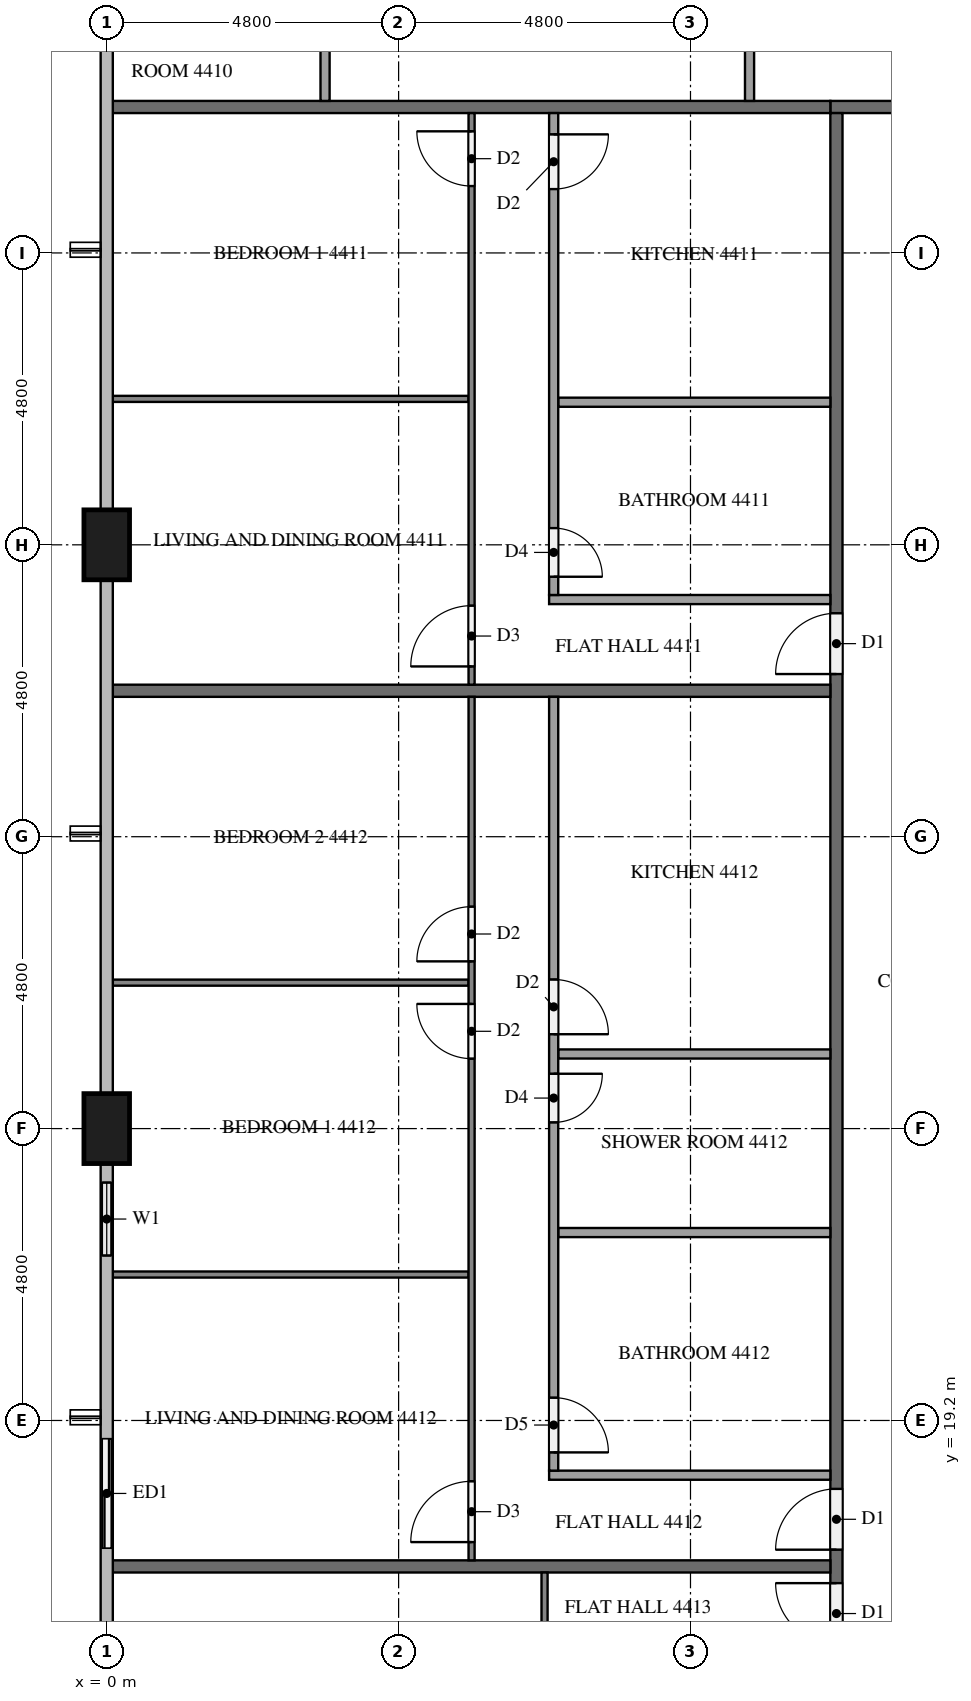
"""IFC4 building model, lengths in metres.
Left out: names, types, materials, properties, quantities, classifications, styles, units other than length and angle.
Written with IfcOpenShell. Run it as: python <this file> out.ifc"""

import sys

from ifc_helpers import new_model, si_unit, direction, frame, frame_2d, origin, origin_2d, place, context, subcontext, project, spatial, rectangle, extrude, element, fill, save


model = new_model("IFC4")
c1 = context("Model", 3, precision=1e-05, world=origin(), true_north=direction((0.0, 1.0)))
c2 = subcontext(c1, "Body", "Model", "MODEL_VIEW")
j1 = project(units=[si_unit("LENGTHUNIT", "METRE"), si_unit("PLANEANGLEUNIT", "RADIAN")], contexts=[c1])
p1 = place(None, origin())
s1 = spatial("IfcSite", under=j1, at=p1, CompositionType="ELEMENT")
p2 = place(p1, origin())
s2 = spatial("IfcBuilding", under=s1, at=p2, CompositionType="ELEMENT")
p3 = place(p2, frame((0.0, 0.0, 170.0)))
s3 = spatial("IfcBuildingStorey", under=s2, at=p3, CompositionType="ELEMENT", Elevation=170.0)
for number, where, z_axis, x_axis in (
    (1, (0.0, 33.6, 0.0), (0.0, 0.0, 1.0), (0.0, 1.0, 0.0)),
    (2, (0.0, 24.0, 0.0), (0.0, 0.0, 1.0), (0.0, 1.0, 0.0)),
):
    element("IfcColumn", number, at=place(p3, frame(where, z_axis=z_axis, x_axis=x_axis)), inside=s3, PredefinedType="COLUMN", context=c2, shape_type="SweptSolid", body=[
        extrude(rectangle(XDim=1.15, YDim=0.75, at=origin_2d()), origin(), (0.0, 0.0, 1.0), 3.1),
    ])
p4 = place(p3, frame((0.0, 23.425, 0.0), z_axis=(0.0, 0.0, 1.0), x_axis=(0.0, -1.0, 0.0)))
e3 = element("IfcWall", 3, at=p4, inside=s3, PredefinedType="SOLIDWALL", context=c2, shape_type="SweptSolid", body=[
    extrude(rectangle(XDim=1.825, YDim=0.15, at=frame_2d((0.913, 0.0))), origin(), (0.0, 0.0, 1.0), 3.1),
])
p5 = place(p4, frame((0.312, 0.0, 0.9)))
e4 = element("IfcOpeningElement", 4, at=p5, cuts=e3, PredefinedType="OPENING", context=c2, shape_type="SweptSolid", body=[
    extrude(rectangle(XDim=1.2, YDim=1.4, at=frame_2d((0.6, 0.7))), frame((0.0, 0.085, 0.0), z_axis=(0.0, -1.0, 0.0), x_axis=(1.0, 0.0, 0.0)), (0.0, 0.0, 1.0), 0.17),
])
p6 = place(p3, frame((0.0, 19.2, 0.0), z_axis=(0.0, 0.0, 1.0), x_axis=(0.0, -1.0, 0.0)))
e5 = element("IfcWall", 5, at=p6, inside=s3, PredefinedType="SOLIDWALL", context=c2, shape_type="SweptSolid", body=[
    extrude(rectangle(XDim=2.4, YDim=0.15, at=frame_2d((1.2, 0.0))), origin(), (0.0, 0.0, 1.0), 3.1),
])
p7 = place(p6, frame((0.3, 0.0, 0.0)))
e6 = element("IfcOpeningElement", 6, at=p7, cuts=e5, PredefinedType="OPENING", context=c2, shape_type="SweptSolid", body=[
    extrude(rectangle(XDim=1.8, YDim=2.4, at=frame_2d((0.9, 1.2))), frame((0.0, 0.085, 0.0), z_axis=(0.0, -1.0, 0.0), x_axis=(1.0, 0.0, 0.0)), (0.0, 0.0, 1.0), 0.17),
])
p8 = place(p3, frame((11.9, 40.8, 0.0), z_axis=(0.0, 0.0, 1.0), x_axis=(1.0, 0.0, 0.0)))
e7 = element("IfcWall", 7, at=p8, inside=s3, PredefinedType="PARTITIONING", context=c2, shape_type="SweptSolid", body=[
    extrude(rectangle(XDim=38.6, YDim=0.2, at=frame_2d((19.3, 0.0))), origin(), (0.0, 0.0, 1.0), 3.1),
])
p9 = place(p8, frame((37.175, 0.0, 0.0)))
e8 = element("IfcOpeningElement", 8, at=p9, cuts=e7, PredefinedType="OPENING", context=c2, shape_type="SweptSolid", body=[
    extrude(rectangle(XDim=1.1, YDim=2.1, at=frame_2d((0.55, 1.05))), frame((0.0, 0.11, 0.0), z_axis=(0.0, -1.0, 0.0), x_axis=(1.0, 0.0, 0.0)), (0.0, 0.0, 1.0), 0.22),
])
p10 = place(p8, frame((18.025, 0.0, 0.0)))
e9 = element("IfcOpeningElement", 9, at=p10, cuts=e7, PredefinedType="OPENING", context=c2, shape_type="SweptSolid", body=[
    extrude(rectangle(XDim=1.0, YDim=2.1, at=frame_2d((0.5, 1.05))), frame((0.0, 0.11, 0.0), z_axis=(0.0, -1.0, 0.0), x_axis=(1.0, 0.0, 0.0)), (0.0, 0.0, 1.0), 0.22),
])
p11 = place(p8, frame((3.625, 0.0, 0.0)))
e10 = element("IfcOpeningElement", 10, at=p11, cuts=e7, PredefinedType="OPENING", context=c2, shape_type="SweptSolid", body=[
    extrude(rectangle(XDim=1.0, YDim=2.1, at=frame_2d((0.5, 1.05))), frame((0.0, 0.11, 0.0), z_axis=(0.0, -1.0, 0.0), x_axis=(1.0, 0.0, 0.0)), (0.0, 0.0, 1.0), 0.22),
])
p12 = place(p3, frame((12.0, 12.1, 0.0), z_axis=(0.0, 0.0, 1.0), x_axis=(0.0, 1.0, 0.0)))
e11 = element("IfcWall", 11, at=p12, inside=s3, PredefinedType="PARTITIONING", context=c2, shape_type="SweptSolid", body=[
    extrude(rectangle(XDim=28.6, YDim=0.2, at=frame_2d((14.3, 0.0))), origin(), (0.0, 0.0, 1.0), 3.1),
])
p13 = place(p12, frame((19.375, 0.0, 0.0)))
e12 = element("IfcOpeningElement", 12, at=p13, cuts=e11, PredefinedType="OPENING", context=c2, shape_type="SweptSolid", body=[
    extrude(rectangle(XDim=1.0, YDim=2.1, at=frame_2d((0.5, 1.05))), frame((0.0, 0.11, 0.0), z_axis=(0.0, -1.0, 0.0), x_axis=(1.0, 0.0, 0.0)), (0.0, 0.0, 1.0), 0.22),
])
p14 = place(p12, frame((4.975, 0.0, 0.0)))
e13 = element("IfcOpeningElement", 13, at=p14, cuts=e11, PredefinedType="OPENING", context=c2, shape_type="SweptSolid", body=[
    extrude(rectangle(XDim=1.0, YDim=2.1, at=frame_2d((0.5, 1.05))), frame((0.0, 0.11, 0.0), z_axis=(0.0, -1.0, 0.0), x_axis=(1.0, 0.0, 0.0)), (0.0, 0.0, 1.0), 0.22),
])
p15 = place(p12, frame((3.425, 0.0, 0.0)))
e14 = element("IfcOpeningElement", 14, at=p15, cuts=e11, PredefinedType="OPENING", context=c2, shape_type="SweptSolid", body=[
    extrude(rectangle(XDim=1.0, YDim=2.1, at=frame_2d((0.5, 1.05))), frame((0.0, 0.11, 0.0), z_axis=(0.0, -1.0, 0.0), x_axis=(1.0, 0.0, 0.0)), (0.0, 0.0, 1.0), 0.22),
])
for number, where, z_axis, x_axis in (
    (15, (0.1, 40.8, 0.0), (0.0, 0.0, 1.0), (1.0, 0.0, 0.0)),
    (16, (0.1, 31.2, 0.0), (0.0, 0.0, 1.0), (1.0, 0.0, 0.0)),
    (17, (0.1, 16.8, 0.0), (0.0, 0.0, 1.0), (1.0, 0.0, 0.0)),
):
    element("IfcWall", number, at=place(p3, frame(where, z_axis=z_axis, x_axis=x_axis)), inside=s3, PredefinedType="PARTITIONING", context=c2, shape_type="SweptSolid", body=[
        extrude(rectangle(XDim=11.8, YDim=0.2, at=frame_2d((5.9, 0.0))), origin(), (0.0, 0.0, 1.0), 3.1),
    ])
for number, where, z_axis, x_axis in (
    (18, (10.571, 40.9, 0.0), (0.0, 0.0, 1.0), (0.0, 1.0, 0.0)),
    (19, (3.59, 40.9, 0.0), (0.0, 0.0, 1.0), (0.0, 1.0, 0.0)),
):
    element("IfcWall", number, at=place(p3, frame(where, z_axis=z_axis, x_axis=x_axis)), inside=s3, PredefinedType="PARTITIONING", context=c2, shape_type="SweptSolid", body=[
        extrude(rectangle(XDim=2.375, YDim=0.15, at=frame_2d((1.188, 0.0))), origin(), (0.0, 0.0, 1.0), 3.1),
    ])
p16 = place(p3, frame((5.95, 36.0, 0.0), z_axis=(0.0, 0.0, 1.0), x_axis=(-1.0, 0.0, 0.0)))
e20 = element("IfcWall", 20, at=p16, inside=s3, PredefinedType="PARTITIONING", context=c2, shape_type="SweptSolid", body=[
    extrude(rectangle(XDim=5.85, YDim=0.1, at=frame_2d((2.925, 0.0))), origin(), (0.0, 0.0, 1.0), 3.1),
])
p17 = place(p3, frame((6.0, 31.3, 0.0), z_axis=(0.0, 0.0, 1.0), x_axis=(0.0, 1.0, 0.0)))
e21 = element("IfcWall", 21, at=p17, inside=s3, PredefinedType="PARTITIONING", context=c2, shape_type="SweptSolid", body=[
    extrude(rectangle(XDim=9.4, YDim=0.1, at=frame_2d((4.7, 0.0))), origin(), (0.0, 0.0, 1.0), 3.1),
])
p18 = place(p17, frame((0.3, 0.0, 0.0)))
e22 = element("IfcOpeningElement", 22, at=p18, cuts=e21, PredefinedType="OPENING", context=c2, shape_type="SweptSolid", body=[
    extrude(rectangle(XDim=1.0, YDim=2.1, at=frame_2d((0.5, 1.05))), frame((0.0, 0.06, 0.0), z_axis=(0.0, -1.0, 0.0), x_axis=(1.0, 0.0, 0.0)), (0.0, 0.0, 1.0), 0.12),
])
p19 = place(p17, frame((8.2, 0.0, 0.0)))
e23 = element("IfcOpeningElement", 23, at=p19, cuts=e21, PredefinedType="OPENING", context=c2, shape_type="SweptSolid", body=[
    extrude(rectangle(XDim=0.9, YDim=2.1, at=frame_2d((0.45, 1.05))), frame((0.0, 0.06, 0.0), z_axis=(0.0, -1.0, 0.0), x_axis=(1.0, 0.0, 0.0)), (0.0, 0.0, 1.0), 0.12),
])
p20 = place(p3, frame((11.9, 35.945, 0.0), z_axis=(0.0, 0.0, 1.0), x_axis=(-1.0, 0.0, 0.0)))
e24 = element("IfcWall", 24, at=p20, inside=s3, PredefinedType="PARTITIONING", context=c2, shape_type="SweptSolid", body=[
    extrude(rectangle(XDim=4.475, YDim=0.15, at=frame_2d((2.237, 0.0))), origin(), (0.0, 0.0, 1.0), 3.1),
])
p21 = place(p3, frame((11.9, 32.7, 0.0), z_axis=(0.0, 0.0, 1.0), x_axis=(-1.0, 0.0, 0.0)))
e25 = element("IfcWall", 25, at=p21, inside=s3, PredefinedType="PARTITIONING", context=c2, shape_type="SweptSolid", body=[
    extrude(rectangle(XDim=4.625, YDim=0.15, at=frame_2d((2.312, 0.0))), origin(), (0.0, 0.0, 1.0), 3.1),
])
p22 = place(p3, frame((7.35, 40.7, 0.0), z_axis=(0.0, 0.0, 1.0), x_axis=(0.0, -1.0, 0.0)))
e26 = element("IfcWall", 26, at=p22, inside=s3, PredefinedType="PARTITIONING", context=c2, shape_type="SweptSolid", body=[
    extrude(rectangle(XDim=7.925, YDim=0.15, at=frame_2d((3.962, 0.0))), origin(), (0.0, 0.0, 1.0), 3.1),
])
p23 = place(p22, frame((6.825, 0.0, 0.0)))
e27 = element("IfcOpeningElement", 27, at=p23, cuts=e26, PredefinedType="OPENING", context=c2, shape_type="SweptSolid", body=[
    extrude(rectangle(XDim=0.8, YDim=2.1, at=frame_2d((0.4, 1.05))), frame((0.0, 0.085, 0.0), z_axis=(0.0, -1.0, 0.0), x_axis=(1.0, 0.0, 0.0)), (0.0, 0.0, 1.0), 0.17),
])
p24 = place(p22, frame((0.35, 0.0, 0.0)))
e28 = element("IfcOpeningElement", 28, at=p24, cuts=e26, PredefinedType="OPENING", context=c2, shape_type="SweptSolid", body=[
    extrude(rectangle(XDim=0.9, YDim=2.1, at=frame_2d((0.45, 1.05))), frame((0.0, 0.085, 0.0), z_axis=(0.0, -1.0, 0.0), x_axis=(1.0, 0.0, 0.0)), (0.0, 0.0, 1.0), 0.17),
])
for number, where, z_axis, x_axis in (
    (29, (5.95, 21.6, 0.0), (0.0, 0.0, 1.0), (-1.0, 0.0, 0.0)),
    (30, (5.95, 26.4, 0.0), (0.0, 0.0, 1.0), (-1.0, 0.0, 0.0)),
):
    element("IfcWall", number, at=place(p3, frame(where, z_axis=z_axis, x_axis=x_axis)), inside=s3, PredefinedType="PARTITIONING", context=c2, shape_type="SweptSolid", body=[
        extrude(rectangle(XDim=5.85, YDim=0.1, at=frame_2d((2.925, 0.0))), origin(), (0.0, 0.0, 1.0), 3.1),
    ])
p25 = place(p3, frame((6.0, 16.9, 0.0), z_axis=(0.0, 0.0, 1.0), x_axis=(0.0, 1.0, 0.0)))
e31 = element("IfcWall", 31, at=p25, inside=s3, PredefinedType="PARTITIONING", context=c2, shape_type="SweptSolid", body=[
    extrude(rectangle(XDim=14.2, YDim=0.1, at=frame_2d((7.1, 0.0))), origin(), (0.0, 0.0, 1.0), 3.1),
])
p26 = place(p25, frame((0.3, 0.0, 0.0)))
e32 = element("IfcOpeningElement", 32, at=p26, cuts=e31, PredefinedType="OPENING", context=c2, shape_type="SweptSolid", body=[
    extrude(rectangle(XDim=1.0, YDim=2.1, at=frame_2d((0.5, 1.05))), frame((0.0, 0.06, 0.0), z_axis=(0.0, -1.0, 0.0), x_axis=(1.0, 0.0, 0.0)), (0.0, 0.0, 1.0), 0.12),
])
p27 = place(p25, frame((8.25, 0.0, 0.0)))
e33 = element("IfcOpeningElement", 33, at=p27, cuts=e31, PredefinedType="OPENING", context=c2, shape_type="SweptSolid", body=[
    extrude(rectangle(XDim=0.9, YDim=2.1, at=frame_2d((0.45, 1.05))), frame((0.0, 0.06, 0.0), z_axis=(0.0, -1.0, 0.0), x_axis=(1.0, 0.0, 0.0)), (0.0, 0.0, 1.0), 0.12),
])
p28 = place(p25, frame((9.85, 0.0, 0.0)))
e34 = element("IfcOpeningElement", 34, at=p28, cuts=e31, PredefinedType="OPENING", context=c2, shape_type="SweptSolid", body=[
    extrude(rectangle(XDim=0.9, YDim=2.1, at=frame_2d((0.45, 1.05))), frame((0.0, 0.06, 0.0), z_axis=(0.0, -1.0, 0.0), x_axis=(1.0, 0.0, 0.0)), (0.0, 0.0, 1.0), 0.12),
])
for number, where, z_axis, x_axis in (
    (35, (11.9, 22.29, 0.0), (0.0, 0.0, 1.0), (-1.0, 0.0, 0.0)),
    (36, (11.9, 25.227, 0.0), (0.0, 0.0, 1.0), (-1.0, 0.0, 0.0)),
):
    element("IfcWall", number, at=place(p3, frame(where, z_axis=z_axis, x_axis=x_axis)), inside=s3, PredefinedType="PARTITIONING", context=c2, shape_type="SweptSolid", body=[
        extrude(rectangle(XDim=4.475, YDim=0.15, at=frame_2d((2.237, 0.0))), origin(), (0.0, 0.0, 1.0), 3.1),
    ])
p29 = place(p3, frame((11.9, 18.3, 0.0), z_axis=(0.0, 0.0, 1.0), x_axis=(-1.0, 0.0, 0.0)))
e37 = element("IfcWall", 37, at=p29, inside=s3, PredefinedType="PARTITIONING", context=c2, shape_type="SweptSolid", body=[
    extrude(rectangle(XDim=4.625, YDim=0.15, at=frame_2d((2.312, 0.0))), origin(), (0.0, 0.0, 1.0), 3.1),
])
p30 = place(p3, frame((7.35, 31.1, 0.0), z_axis=(0.0, 0.0, 1.0), x_axis=(0.0, -1.0, 0.0)))
e38 = element("IfcWall", 38, at=p30, inside=s3, PredefinedType="PARTITIONING", context=c2, shape_type="SweptSolid", body=[
    extrude(rectangle(XDim=12.725, YDim=0.15, at=frame_2d((6.363, 0.0))), origin(), (0.0, 0.0, 1.0), 3.1),
])
p31 = place(p30, frame((11.525, 0.0, 0.0)))
e39 = element("IfcOpeningElement", 39, at=p31, cuts=e38, PredefinedType="OPENING", context=c2, shape_type="SweptSolid", body=[
    extrude(rectangle(XDim=0.9, YDim=2.1, at=frame_2d((0.45, 1.05))), frame((0.0, 0.085, 0.0), z_axis=(0.0, -1.0, 0.0), x_axis=(1.0, 0.0, 0.0)), (0.0, 0.0, 1.0), 0.17),
])
p32 = place(p30, frame((6.198, 0.0, 0.0)))
e40 = element("IfcOpeningElement", 40, at=p32, cuts=e38, PredefinedType="OPENING", context=c2, shape_type="SweptSolid", body=[
    extrude(rectangle(XDim=0.8, YDim=2.1, at=frame_2d((0.4, 1.05))), frame((0.0, 0.085, 0.0), z_axis=(0.0, -1.0, 0.0), x_axis=(1.0, 0.0, 0.0)), (0.0, 0.0, 1.0), 0.17),
])
p33 = place(p30, frame((4.648, 0.0, 0.0)))
e41 = element("IfcOpeningElement", 41, at=p33, cuts=e38, PredefinedType="OPENING", context=c2, shape_type="SweptSolid", body=[
    extrude(rectangle(XDim=0.9, YDim=2.1, at=frame_2d((0.45, 1.05))), frame((0.0, 0.085, 0.0), z_axis=(0.0, -1.0, 0.0), x_axis=(1.0, 0.0, 0.0)), (0.0, 0.0, 1.0), 0.17),
])
p34 = place(p3, frame((7.2, 0.1, 0.0), z_axis=(0.0, 0.0, 1.0), x_axis=(0.0, 1.0, 0.0)))
e42 = element("IfcWall", 42, at=p34, inside=s3, PredefinedType="PARTITIONING", context=c2, shape_type="SweptSolid", body=[
    extrude(rectangle(XDim=16.6, YDim=0.1, at=frame_2d((8.3, 0.0))), origin(), (0.0, 0.0, 1.0), 3.1),
])
p35 = place(p34, frame((9.85, 0.0, 0.0)))
e43 = element("IfcOpeningElement", 43, at=p35, cuts=e42, PredefinedType="OPENING", context=c2, shape_type="SweptSolid", body=[
    extrude(rectangle(XDim=1.0, YDim=2.1, at=frame_2d((0.5, 1.05))), frame((0.0, 0.06, 0.0), z_axis=(0.0, -1.0, 0.0), x_axis=(1.0, 0.0, 0.0)), (0.0, 0.0, 1.0), 0.12),
])
p36 = place(p34, frame((8.25, 0.0, 0.0)))
e44 = element("IfcOpeningElement", 44, at=p36, cuts=e42, PredefinedType="OPENING", context=c2, shape_type="SweptSolid", body=[
    extrude(rectangle(XDim=0.9, YDim=2.1, at=frame_2d((0.45, 1.05))), frame((0.0, 0.06, 0.0), z_axis=(0.0, -1.0, 0.0), x_axis=(1.0, 0.0, 0.0)), (0.0, 0.0, 1.0), 0.12),
])
p37 = place(p34, frame((0.3, 0.0, 0.0)))
e45 = element("IfcOpeningElement", 45, at=p37, cuts=e42, PredefinedType="OPENING", context=c2, shape_type="SweptSolid", body=[
    extrude(rectangle(XDim=0.9, YDim=2.1, at=frame_2d((0.45, 1.05))), frame((0.0, 0.06, 0.0), z_axis=(0.0, -1.0, 0.0), x_axis=(1.0, 0.0, 0.0)), (0.0, 0.0, 1.0), 0.12),
])
p38 = place(p5, origin())
e46 = element("IfcWindow", 46, at=p38, inside=s3, PartitioningType="SINGLE_PANEL", PredefinedType="WINDOW", context=c2, shape_type="SweptSolid", body=[
    extrude(rectangle(XDim=1.2, YDim=1.4, at=frame_2d((0.6, 0.7))), frame((0.0, 0.03, 0.0), z_axis=(0.0, -1.0, 0.0), x_axis=(1.0, 0.0, 0.0)), (0.0, 0.0, 1.0), 0.06),
])
fill(e4, e46)
p39 = place(p7, origin())
e47 = element("IfcDoor", 47, at=p39, inside=s3, OperationType="SLIDING_TO_LEFT", PredefinedType="DOOR", context=c2, shape_type="SweptSolid", body=[
    extrude(rectangle(XDim=1.8, YDim=2.4, at=frame_2d((0.9, 1.2))), frame((0.0, 0.025, 0.0), z_axis=(0.0, -1.0, 0.0), x_axis=(1.0, 0.0, 0.0)), (0.0, 0.0, 1.0), 0.05),
])
fill(e6, e47)
p40 = place(p13, origin())
e48 = element("IfcDoor", 48, at=p40, inside=s3, OperationType="SINGLE_SWING_LEFT", PredefinedType="DOOR", context=c2, shape_type="SweptSolid", body=[
    extrude(rectangle(XDim=1.0, YDim=2.1, at=frame_2d((0.5, 1.05))), frame((0.0, 0.025, 0.0), z_axis=(0.0, -1.0, 0.0), x_axis=(1.0, 0.0, 0.0)), (0.0, 0.0, 1.0), 0.05),
])
fill(e12, e48)
p41 = place(p14, origin())
e49 = element("IfcDoor", 49, at=p41, inside=s3, OperationType="SINGLE_SWING_LEFT", PredefinedType="DOOR", context=c2, shape_type="SweptSolid", body=[
    extrude(rectangle(XDim=1.0, YDim=2.1, at=frame_2d((0.5, 1.05))), frame((0.0, 0.025, 0.0), z_axis=(0.0, -1.0, 0.0), x_axis=(1.0, 0.0, 0.0)), (0.0, 0.0, 1.0), 0.05),
])
fill(e13, e49)
p42 = place(p15, origin())
e50 = element("IfcDoor", 50, at=p42, inside=s3, OperationType="SINGLE_SWING_RIGHT", PredefinedType="DOOR", context=c2, shape_type="SweptSolid", body=[
    extrude(rectangle(XDim=1.0, YDim=2.1, at=frame_2d((0.5, 1.05))), frame((0.0, 0.025, 0.0), z_axis=(0.0, -1.0, 0.0), x_axis=(1.0, 0.0, 0.0)), (0.0, 0.0, 1.0), 0.05),
])
fill(e14, e50)
p43 = place(p18, origin())
e51 = element("IfcDoor", 51, at=p43, inside=s3, OperationType="SINGLE_SWING_LEFT", PredefinedType="DOOR", context=c2, shape_type="SweptSolid", body=[
    extrude(rectangle(XDim=1.0, YDim=2.1, at=frame_2d((0.5, 1.05))), frame((0.0, 0.025, 0.0), z_axis=(0.0, -1.0, 0.0), x_axis=(1.0, 0.0, 0.0)), (0.0, 0.0, 1.0), 0.05),
])
fill(e22, e51)
p44 = place(p19, origin())
e52 = element("IfcDoor", 52, at=p44, inside=s3, OperationType="SINGLE_SWING_RIGHT", PredefinedType="DOOR", context=c2, shape_type="SweptSolid", body=[
    extrude(rectangle(XDim=0.9, YDim=2.1, at=frame_2d((0.45, 1.05))), frame((0.0, 0.025, 0.0), z_axis=(0.0, -1.0, 0.0), x_axis=(1.0, 0.0, 0.0)), (0.0, 0.0, 1.0), 0.05),
])
fill(e23, e52)
p45 = place(p23, origin())
e53 = element("IfcDoor", 53, at=p45, inside=s3, OperationType="SINGLE_SWING_RIGHT", PredefinedType="DOOR", context=c2, shape_type="SweptSolid", body=[
    extrude(rectangle(XDim=0.8, YDim=2.1, at=frame_2d((0.4, 1.05))), frame((0.0, 0.025, 0.0), z_axis=(0.0, -1.0, 0.0), x_axis=(1.0, 0.0, 0.0)), (0.0, 0.0, 1.0), 0.05),
])
fill(e27, e53)
p46 = place(p24, origin())
e54 = element("IfcDoor", 54, at=p46, inside=s3, OperationType="SINGLE_SWING_LEFT", PredefinedType="DOOR", context=c2, shape_type="SweptSolid", body=[
    extrude(rectangle(XDim=0.9, YDim=2.1, at=frame_2d((0.45, 1.05))), frame((0.0, 0.025, 0.0), z_axis=(0.0, -1.0, 0.0), x_axis=(1.0, 0.0, 0.0)), (0.0, 0.0, 1.0), 0.05),
])
fill(e28, e54)
p47 = place(p26, origin())
e55 = element("IfcDoor", 55, at=p47, inside=s3, OperationType="SINGLE_SWING_LEFT", PredefinedType="DOOR", context=c2, shape_type="SweptSolid", body=[
    extrude(rectangle(XDim=1.0, YDim=2.1, at=frame_2d((0.5, 1.05))), frame((0.0, 0.025, 0.0), z_axis=(0.0, -1.0, 0.0), x_axis=(1.0, 0.0, 0.0)), (0.0, 0.0, 1.0), 0.05),
])
fill(e32, e55)
p48 = place(p27, origin())
e56 = element("IfcDoor", 56, at=p48, inside=s3, OperationType="SINGLE_SWING_RIGHT", PredefinedType="DOOR", context=c2, shape_type="SweptSolid", body=[
    extrude(rectangle(XDim=0.9, YDim=2.1, at=frame_2d((0.45, 1.05))), frame((0.0, 0.025, 0.0), z_axis=(0.0, -1.0, 0.0), x_axis=(1.0, 0.0, 0.0)), (0.0, 0.0, 1.0), 0.05),
])
fill(e33, e56)
p49 = place(p28, origin())
e57 = element("IfcDoor", 57, at=p49, inside=s3, OperationType="SINGLE_SWING_LEFT", PredefinedType="DOOR", context=c2, shape_type="SweptSolid", body=[
    extrude(rectangle(XDim=0.9, YDim=2.1, at=frame_2d((0.45, 1.05))), frame((0.0, 0.025, 0.0), z_axis=(0.0, -1.0, 0.0), x_axis=(1.0, 0.0, 0.0)), (0.0, 0.0, 1.0), 0.05),
])
fill(e34, e57)
p50 = place(p31, origin())
e58 = element("IfcDoor", 58, at=p50, inside=s3, OperationType="SINGLE_SWING_RIGHT", PredefinedType="DOOR", context=c2, shape_type="SweptSolid", body=[
    extrude(rectangle(XDim=0.9, YDim=2.1, at=frame_2d((0.45, 1.05))), frame((0.0, 0.025, 0.0), z_axis=(0.0, -1.0, 0.0), x_axis=(1.0, 0.0, 0.0)), (0.0, 0.0, 1.0), 0.05),
])
fill(e39, e58)
p51 = place(p32, origin())
e59 = element("IfcDoor", 59, at=p51, inside=s3, OperationType="SINGLE_SWING_LEFT", PredefinedType="DOOR", context=c2, shape_type="SweptSolid", body=[
    extrude(rectangle(XDim=0.8, YDim=2.1, at=frame_2d((0.4, 1.05))), frame((0.0, 0.025, 0.0), z_axis=(0.0, -1.0, 0.0), x_axis=(1.0, 0.0, 0.0)), (0.0, 0.0, 1.0), 0.05),
])
fill(e40, e59)
p52 = place(p33, origin())
e60 = element("IfcDoor", 60, at=p52, inside=s3, OperationType="SINGLE_SWING_RIGHT", PredefinedType="DOOR", context=c2, shape_type="SweptSolid", body=[
    extrude(rectangle(XDim=0.9, YDim=2.1, at=frame_2d((0.45, 1.05))), frame((0.0, 0.025, 0.0), z_axis=(0.0, -1.0, 0.0), x_axis=(1.0, 0.0, 0.0)), (0.0, 0.0, 1.0), 0.05),
])
fill(e41, e60)
save(model, sys.argv[1])
